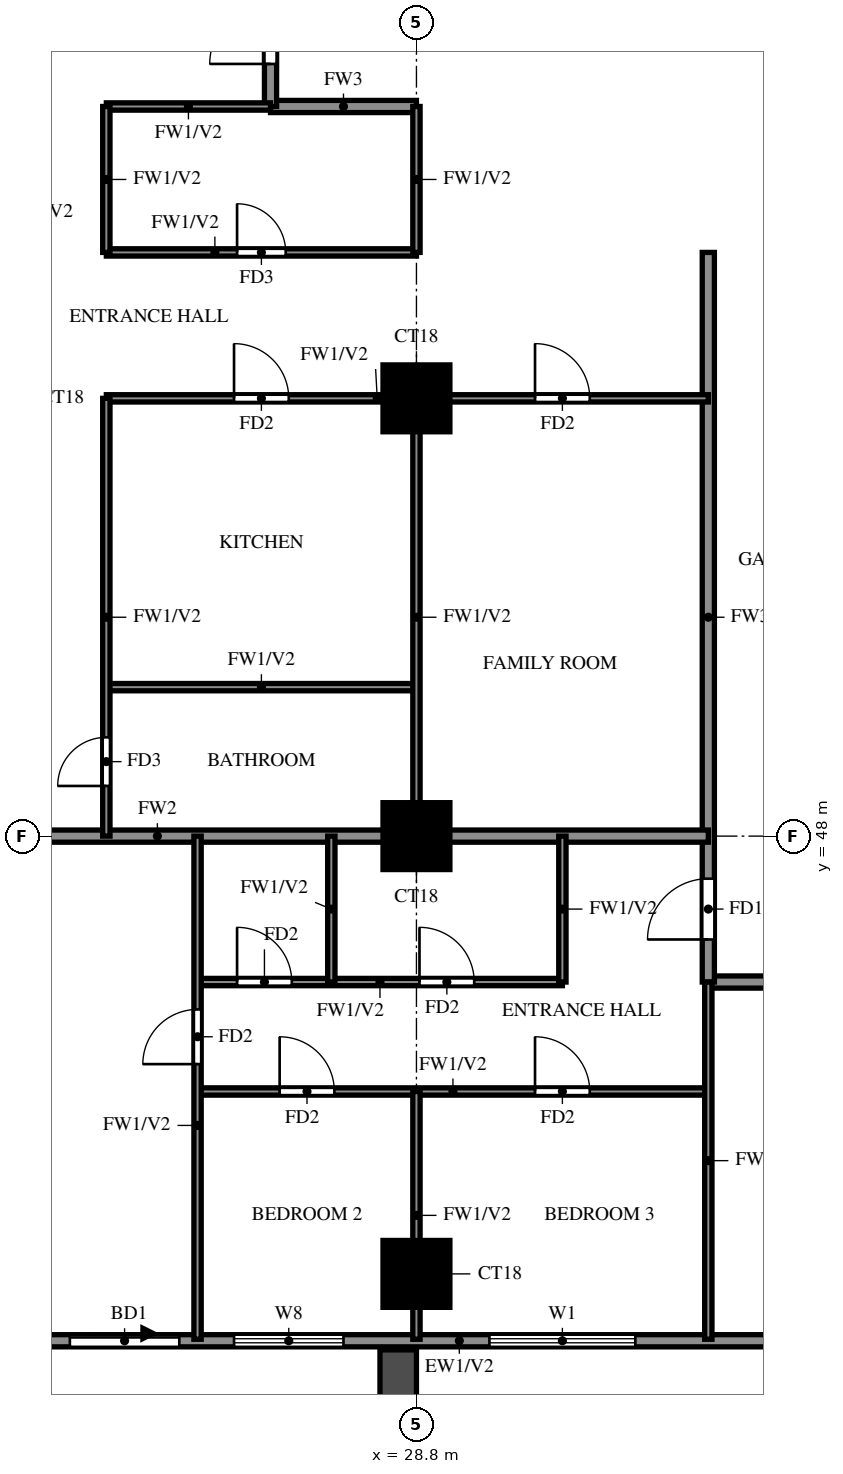
"""IFC4 building model, lengths in metres.
Left out: names, types, materials, properties, quantities, classifications, styles, units other than length and angle.
Written with IfcOpenShell. Run it as: python <this file> out.ifc"""

import sys

from ifc_helpers import new_model, si_unit, direction, frame, frame_2d, origin, origin_2d, place, context, subcontext, project, spatial, rectangle, extrude, source, transform, mapped, element, fill, save


model = new_model("IFC4")
c1 = context("Model", 3, precision=1e-05, world=origin(), true_north=direction((0.0, 1.0)))
c2 = subcontext(c1, "Body", "Model", "MODEL_VIEW")
j1 = project(units=[si_unit("LENGTHUNIT", "METRE"), si_unit("PLANEANGLEUNIT", "RADIAN")], contexts=[c1])
p1 = place(None, origin())
s1 = spatial("IfcSite", under=j1, at=p1, CompositionType="ELEMENT")
p2 = place(p1, origin())
s2 = spatial("IfcBuilding", under=s1, at=p2, CompositionType="ELEMENT")
p3 = place(p2, frame((0.0, 0.0, 116.5)))
s3 = spatial("IfcBuildingStorey", under=s2, at=p3, CompositionType="ELEMENT", Elevation=116.5)
m1 = source(origin(), c2, "Body", "SweptSolid", [
    extrude(rectangle(XDim=1.1, YDim=1.1, at=origin_2d()), origin(), (0.0, 0.0, 1.0), 3.2),
])
for number, where, z_axis, x_axis in (
    (1, (28.8, 40.8, 0.0), (0.0, 0.0, 1.0), (1.0, 0.0, 0.0)),
    (2, (28.8, 48.0, 0.0), (0.0, 0.0, 1.0), (1.0, 0.0, 0.0)),
    (3, (28.8, 55.2, 0.0), (0.0, 0.0, 1.0), (1.0, 0.0, 0.0)),
):
    element("IfcColumn", number, at=place(p3, frame(where, z_axis=z_axis, x_axis=x_axis)), inside=s3, PredefinedType="COLUMN", context=c2, shape_type="MappedRepresentation", body=[
        mapped(m1, transform((0.0, 0.0, 0.0))),
    ])
p4 = place(p3, frame((18.2, 39.7, 0.0), z_axis=(0.0, 0.0, 1.0), x_axis=(1.0, 0.0, 0.0)))
e4 = element("IfcWall", 4, at=p4, inside=s3, PredefinedType="SOLIDWALL", context=c2, shape_type="SweptSolid", body=[
    extrude(rectangle(XDim=23.8, YDim=0.2, at=frame_2d((11.9, 0.0))), origin(), (0.0, 0.0, 1.0), 3.2),
])
p5 = place(p4, frame((4.9, 0.0, 0.0)))
e5 = element("IfcOpeningElement", 5, at=p5, cuts=e4, PredefinedType="OPENING", context=c2, shape_type="SweptSolid", body=[
    extrude(rectangle(XDim=1.8, YDim=2.4, at=frame_2d((0.9, 1.2))), frame((0.0, 0.11, 0.0), z_axis=(0.0, -1.0, 0.0), x_axis=(1.0, 0.0, 0.0)), (0.0, 0.0, 1.0), 0.22),
])
p6 = place(p4, frame((0.6, 0.0, 0.6)))
e6 = element("IfcOpeningElement", 6, at=p6, cuts=e4, PredefinedType="OPENING", context=c2, shape_type="SweptSolid", body=[
    extrude(rectangle(XDim=2.4, YDim=2.4, at=frame_2d((1.2, 1.2))), frame((0.0, 0.11, 0.0), z_axis=(0.0, -1.0, 0.0), x_axis=(1.0, 0.0, 0.0)), (0.0, 0.0, 1.0), 0.22),
])
p7 = place(p4, frame((7.6, 0.0, 0.6)))
e7 = element("IfcOpeningElement", 7, at=p7, cuts=e4, PredefinedType="OPENING", context=c2, shape_type="SweptSolid", body=[
    extrude(rectangle(XDim=1.8, YDim=2.4, at=frame_2d((0.9, 1.2))), frame((0.0, 0.11, 0.0), z_axis=(0.0, -1.0, 0.0), x_axis=(1.0, 0.0, 0.0)), (0.0, 0.0, 1.0), 0.22),
])
p8 = place(p4, frame((11.8, 0.0, 0.6)))
e8 = element("IfcOpeningElement", 8, at=p8, cuts=e4, PredefinedType="OPENING", context=c2, shape_type="SweptSolid", body=[
    extrude(rectangle(XDim=2.4, YDim=2.4, at=frame_2d((1.2, 1.2))), frame((0.0, 0.11, 0.0), z_axis=(0.0, -1.0, 0.0), x_axis=(1.0, 0.0, 0.0)), (0.0, 0.0, 1.0), 0.22),
])
p9 = place(p3, frame((28.5, 39.55, 0.0), z_axis=(0.0, 0.0, 1.0), x_axis=(0.0, -1.0, 0.0)))
e9 = element("IfcWall", 9, at=p9, inside=s3, PredefinedType="SOLIDWALL", context=c2, shape_type="SweptSolid", body=[
    extrude(rectangle(XDim=2.65, YDim=0.6, at=frame_2d((1.325, 0.0))), origin(), (0.0, 0.0, 1.0), 2.85),
])
p10 = place(p3, frame((33.6, 45.6, 0.0), z_axis=(0.0, 0.0, 1.0), x_axis=(1.0, 0.0, 0.0)))
e10 = element("IfcWall", 10, at=p10, inside=s3, PredefinedType="SOLIDWALL", context=c2, shape_type="SweptSolid", body=[
    extrude(rectangle(XDim=7.2, YDim=0.2, at=frame_2d((3.6, 0.0))), origin(), (0.0, 0.0, 1.0), 3.2),
])
p11 = place(p10, frame((3.15, 0.0, 0.0)))
e11 = element("IfcOpeningElement", 11, at=p11, cuts=e10, PredefinedType="OPENING", context=c2, shape_type="SweptSolid", body=[
    extrude(rectangle(XDim=0.9, YDim=2.1, at=frame_2d((0.45, 1.05))), frame((0.0, 0.11, 0.0), z_axis=(0.0, -1.0, 0.0), x_axis=(1.0, 0.0, 0.0)), (0.0, 0.0, 1.0), 0.22),
])
p12 = place(p3, frame((26.4, 60.0, 0.0), z_axis=(0.0, 0.0, 1.0), x_axis=(1.0, 0.0, 0.0)))
e12 = element("IfcWall", 12, at=p12, inside=s3, PredefinedType="SOLIDWALL", context=c2, shape_type="SweptSolid", body=[
    extrude(rectangle(XDim=2.4, YDim=0.2, at=frame_2d((1.2, 0.0))), origin(), (0.0, 0.0, 1.0), 3.2),
])
p13 = place(p3, frame((26.4, 60.0, 0.0), z_axis=(0.0, 0.0, 1.0), x_axis=(0.0, 1.0, 0.0)))
e13 = element("IfcWall", 13, at=p13, inside=s3, PredefinedType="SOLIDWALL", context=c2, shape_type="SweptSolid", body=[
    extrude(rectangle(XDim=9.6, YDim=0.2, at=frame_2d((4.8, 0.0))), origin(), (0.0, 0.0, 1.0), 3.2),
])
p14 = place(p13, frame((0.7, 0.0, 0.0)))
e14 = element("IfcOpeningElement", 14, at=p14, cuts=e13, PredefinedType="OPENING", context=c2, shape_type="SweptSolid", body=[
    extrude(rectangle(XDim=1.0, YDim=2.1, at=frame_2d((0.5, 1.05))), frame((0.0, 0.11, 0.0), z_axis=(0.0, -1.0, 0.0), x_axis=(1.0, 0.0, 0.0)), (0.0, 0.0, 1.0), 0.22),
])
p15 = place(p13, frame((3.1, 0.0, 0.0)))
e15 = element("IfcOpeningElement", 15, at=p15, cuts=e13, PredefinedType="OPENING", context=c2, shape_type="SweptSolid", body=[
    extrude(rectangle(XDim=1.0, YDim=2.1, at=frame_2d((0.5, 1.05))), frame((0.0, 0.11, 0.0), z_axis=(0.0, -1.0, 0.0), x_axis=(1.0, 0.0, 0.0)), (0.0, 0.0, 1.0), 0.22),
])
p16 = place(p3, frame((33.6, 45.6, 0.0), z_axis=(0.0, 0.0, 1.0), x_axis=(0.0, 1.0, 0.0)))
e16 = element("IfcWall", 16, at=p16, inside=s3, PredefinedType="SOLIDWALL", context=c2, shape_type="SweptSolid", body=[
    extrude(rectangle(XDim=12.0, YDim=0.2, at=frame_2d((6.0, 0.0))), origin(), (0.0, 0.0, 1.0), 3.2),
])
p17 = place(p16, frame((0.7, 0.0, 0.0)))
e17 = element("IfcOpeningElement", 17, at=p17, cuts=e16, PredefinedType="OPENING", context=c2, shape_type="SweptSolid", body=[
    extrude(rectangle(XDim=1.0, YDim=2.1, at=frame_2d((0.5, 1.05))), frame((0.0, 0.11, 0.0), z_axis=(0.0, -1.0, 0.0), x_axis=(1.0, 0.0, 0.0)), (0.0, 0.0, 1.0), 0.22),
])
p18 = place(p3, frame((14.525, 48.0, 0.0), z_axis=(0.0, 0.0, 1.0), x_axis=(1.0, 0.0, 0.0)))
e18 = element("IfcWall", 18, at=p18, inside=s3, PredefinedType="SOLIDWALL", context=c2, shape_type="SweptSolid", body=[
    extrude(rectangle(XDim=19.075, YDim=0.2, at=frame_2d((9.538, 0.0))), origin(), (0.0, 0.0, 1.0), 3.2),
])
p19 = place(p3, frame((25.2, 43.8, 0.0), z_axis=(0.0, 0.0, 1.0), x_axis=(1.0, 0.0, 0.0)))
e19 = element("IfcWall", 19, at=p19, inside=s3, PredefinedType="PARTITIONING", context=c2, shape_type="SweptSolid", body=[
    extrude(rectangle(XDim=8.4, YDim=0.12, at=frame_2d((4.2, 0.0))), origin(), (0.0, 0.0, 1.0), 3.2),
])
p20 = place(p19, frame((1.35, 0.0, 0.0)))
e20 = element("IfcOpeningElement", 20, at=p20, cuts=e19, PredefinedType="OPENING", context=c2, shape_type="SweptSolid", body=[
    extrude(rectangle(XDim=0.9, YDim=2.1, at=frame_2d((0.45, 1.05))), frame((0.0, 0.07, 0.0), z_axis=(0.0, -1.0, 0.0), x_axis=(1.0, 0.0, 0.0)), (0.0, 0.0, 1.0), 0.14),
])
p21 = place(p19, frame((5.55, 0.0, 0.0)))
e21 = element("IfcOpeningElement", 21, at=p21, cuts=e19, PredefinedType="OPENING", context=c2, shape_type="SweptSolid", body=[
    extrude(rectangle(XDim=0.9, YDim=2.1, at=frame_2d((0.45, 1.05))), frame((0.0, 0.07, 0.0), z_axis=(0.0, -1.0, 0.0), x_axis=(1.0, 0.0, 0.0)), (0.0, 0.0, 1.0), 0.14),
])
p22 = place(p3, frame((25.2, 45.6, 0.0), z_axis=(0.0, 0.0, 1.0), x_axis=(1.0, 0.0, 0.0)))
e22 = element("IfcWall", 22, at=p22, inside=s3, PredefinedType="PARTITIONING", context=c2, shape_type="SweptSolid", body=[
    extrude(rectangle(XDim=6.0, YDim=0.12, at=frame_2d((3.0, 0.0))), origin(), (0.0, 0.0, 1.0), 3.2),
])
p23 = place(p22, frame((0.65, 0.0, 0.0)))
e23 = element("IfcOpeningElement", 23, at=p23, cuts=e22, PredefinedType="OPENING", context=c2, shape_type="SweptSolid", body=[
    extrude(rectangle(XDim=0.9, YDim=2.1, at=frame_2d((0.45, 1.05))), frame((0.0, 0.07, 0.0), z_axis=(0.0, -1.0, 0.0), x_axis=(1.0, 0.0, 0.0)), (0.0, 0.0, 1.0), 0.14),
])
p24 = place(p22, frame((3.65, 0.0, 0.0)))
e24 = element("IfcOpeningElement", 24, at=p24, cuts=e22, PredefinedType="OPENING", context=c2, shape_type="SweptSolid", body=[
    extrude(rectangle(XDim=0.9, YDim=2.1, at=frame_2d((0.45, 1.05))), frame((0.0, 0.07, 0.0), z_axis=(0.0, -1.0, 0.0), x_axis=(1.0, 0.0, 0.0)), (0.0, 0.0, 1.0), 0.14),
])
p25 = place(p3, frame((23.7, 50.45, 0.0), z_axis=(0.0, 0.0, 1.0), x_axis=(1.0, 0.0, 0.0)))
e25 = element("IfcWall", 25, at=p25, inside=s3, PredefinedType="PARTITIONING", context=c2, shape_type="SweptSolid", body=[
    extrude(rectangle(XDim=5.1, YDim=0.12, at=frame_2d((2.55, 0.0))), origin(), (0.0, 0.0, 1.0), 3.2),
])
p26 = place(p3, frame((23.7, 55.2, 0.0), z_axis=(0.0, 0.0, 1.0), x_axis=(1.0, 0.0, 0.0)))
e26 = element("IfcWall", 26, at=p26, inside=s3, PredefinedType="PARTITIONING", context=c2, shape_type="SweptSolid", body=[
    extrude(rectangle(XDim=9.9, YDim=0.12, at=frame_2d((4.95, 0.0))), origin(), (0.0, 0.0, 1.0), 3.2),
])
p27 = place(p26, frame((2.1, 0.0, 0.0)))
e27 = element("IfcOpeningElement", 27, at=p27, cuts=e26, PredefinedType="OPENING", context=c2, shape_type="SweptSolid", body=[
    extrude(rectangle(XDim=0.9, YDim=2.1, at=frame_2d((0.45, 1.05))), frame((0.0, 0.07, 0.0), z_axis=(0.0, -1.0, 0.0), x_axis=(1.0, 0.0, 0.0)), (0.0, 0.0, 1.0), 0.14),
])
p28 = place(p26, frame((7.05, 0.0, 0.0)))
e28 = element("IfcOpeningElement", 28, at=p28, cuts=e26, PredefinedType="OPENING", context=c2, shape_type="SweptSolid", body=[
    extrude(rectangle(XDim=0.9, YDim=2.1, at=frame_2d((0.45, 1.05))), frame((0.0, 0.07, 0.0), z_axis=(0.0, -1.0, 0.0), x_axis=(1.0, 0.0, 0.0)), (0.0, 0.0, 1.0), 0.14),
])
p29 = place(p3, frame((23.7, 57.6, 0.0), z_axis=(0.0, 0.0, 1.0), x_axis=(1.0, 0.0, 0.0)))
e29 = element("IfcWall", 29, at=p29, inside=s3, PredefinedType="PARTITIONING", context=c2, shape_type="SweptSolid", body=[
    extrude(rectangle(XDim=5.1, YDim=0.12, at=frame_2d((2.55, 0.0))), origin(), (0.0, 0.0, 1.0), 3.2),
])
p30 = place(p29, frame((2.15, 0.0, 0.0)))
e30 = element("IfcOpeningElement", 30, at=p30, cuts=e29, PredefinedType="OPENING", context=c2, shape_type="SweptSolid", body=[
    extrude(rectangle(XDim=0.8, YDim=2.1, at=frame_2d((0.4, 1.05))), frame((0.0, 0.07, 0.0), z_axis=(0.0, -1.0, 0.0), x_axis=(1.0, 0.0, 0.0)), (0.0, 0.0, 1.0), 0.14),
])
p31 = place(p3, frame((23.7, 60.0, 0.0), z_axis=(0.0, 0.0, 1.0), x_axis=(1.0, 0.0, 0.0)))
e31 = element("IfcWall", 31, at=p31, inside=s3, PredefinedType="PARTITIONING", context=c2, shape_type="SweptSolid", body=[
    extrude(rectangle(XDim=2.7, YDim=0.12, at=frame_2d((1.35, 0.0))), origin(), (0.0, 0.0, 1.0), 3.2),
])
p32 = place(p3, frame((23.7, 48.0, 0.0), z_axis=(0.0, 0.0, 1.0), x_axis=(0.0, 1.0, 0.0)))
e32 = element("IfcWall", 32, at=p32, inside=s3, PredefinedType="PARTITIONING", context=c2, shape_type="SweptSolid", body=[
    extrude(rectangle(XDim=7.2, YDim=0.12, at=frame_2d((3.6, 0.0))), origin(), (0.0, 0.0, 1.0), 3.2),
])
p33 = place(p32, frame((0.825, 0.0, 0.0)))
e33 = element("IfcOpeningElement", 33, at=p33, cuts=e32, PredefinedType="OPENING", context=c2, shape_type="SweptSolid", body=[
    extrude(rectangle(XDim=0.8, YDim=2.1, at=frame_2d((0.4, 1.05))), frame((0.0, 0.07, 0.0), z_axis=(0.0, -1.0, 0.0), x_axis=(1.0, 0.0, 0.0)), (0.0, 0.0, 1.0), 0.14),
])
p34 = place(p3, frame((23.7, 57.6, 0.0), z_axis=(0.0, 0.0, 1.0), x_axis=(0.0, 1.0, 0.0)))
e34 = element("IfcWall", 34, at=p34, inside=s3, PredefinedType="PARTITIONING", context=c2, shape_type="SweptSolid", body=[
    extrude(rectangle(XDim=2.4, YDim=0.12, at=frame_2d((1.2, 0.0))), origin(), (0.0, 0.0, 1.0), 3.2),
])
p35 = place(p3, frame((25.2, 39.725, 0.0), z_axis=(0.0, 0.0, 1.0), x_axis=(0.0, 1.0, 0.0)))
e35 = element("IfcWall", 35, at=p35, inside=s3, PredefinedType="PARTITIONING", context=c2, shape_type="SweptSolid", body=[
    extrude(rectangle(XDim=8.275, YDim=0.12, at=frame_2d((4.137, 0.0))), origin(), (0.0, 0.0, 1.0), 3.2),
])
p36 = place(p35, frame((4.525, 0.0, 0.0)))
e36 = element("IfcOpeningElement", 36, at=p36, cuts=e35, PredefinedType="OPENING", context=c2, shape_type="SweptSolid", body=[
    extrude(rectangle(XDim=0.9, YDim=2.1, at=frame_2d((0.45, 1.05))), frame((0.0, 0.07, 0.0), z_axis=(0.0, -1.0, 0.0), x_axis=(1.0, 0.0, 0.0)), (0.0, 0.0, 1.0), 0.14),
])
p37 = place(p3, frame((27.4, 45.6, 0.0), z_axis=(0.0, 0.0, 1.0), x_axis=(0.0, 1.0, 0.0)))
e37 = element("IfcWall", 37, at=p37, inside=s3, PredefinedType="PARTITIONING", context=c2, shape_type="SweptSolid", body=[
    extrude(rectangle(XDim=2.4, YDim=0.12, at=frame_2d((1.2, 0.0))), origin(), (0.0, 0.0, 1.0), 3.2),
])
p38 = place(p3, frame((28.8, 39.725, 0.0), z_axis=(0.0, 0.0, 1.0), x_axis=(0.0, 1.0, 0.0)))
e38 = element("IfcWall", 38, at=p38, inside=s3, PredefinedType="PARTITIONING", context=c2, shape_type="SweptSolid", body=[
    extrude(rectangle(XDim=4.075, YDim=0.12, at=frame_2d((2.038, 0.0))), origin(), (0.0, 0.0, 1.0), 3.2),
])
p39 = place(p3, frame((28.8, 48.0, 0.0), z_axis=(0.0, 0.0, 1.0), x_axis=(0.0, 1.0, 0.0)))
e39 = element("IfcWall", 39, at=p39, inside=s3, PredefinedType="PARTITIONING", context=c2, shape_type="SweptSolid", body=[
    extrude(rectangle(XDim=7.2, YDim=0.12, at=frame_2d((3.6, 0.0))), origin(), (0.0, 0.0, 1.0), 3.2),
])
for number, where, z_axis, x_axis in (
    (40, (28.8, 57.6, 0.0), (0.0, 0.0, 1.0), (0.0, 1.0, 0.0)),
    (41, (31.2, 45.6, 0.0), (0.0, 0.0, 1.0), (0.0, 1.0, 0.0)),
):
    element("IfcWall", number, at=place(p3, frame(where, z_axis=z_axis, x_axis=x_axis)), inside=s3, PredefinedType="PARTITIONING", context=c2, shape_type="SweptSolid", body=[
        extrude(rectangle(XDim=2.4, YDim=0.12, at=frame_2d((1.2, 0.0))), origin(), (0.0, 0.0, 1.0), 3.2),
    ])
p40 = place(p3, frame((33.6, 39.725, 0.0), z_axis=(0.0, 0.0, 1.0), x_axis=(0.0, 1.0, 0.0)))
e42 = element("IfcWall", 42, at=p40, inside=s3, PredefinedType="PARTITIONING", context=c2, shape_type="SweptSolid", body=[
    extrude(rectangle(XDim=5.875, YDim=0.12, at=frame_2d((2.938, 0.0))), origin(), (0.0, 0.0, 1.0), 3.2),
])
p41 = place(p5, origin())
e43 = element("IfcDoor", 43, at=p41, inside=s3, OperationType="DOUBLE_DOOR_SLIDING", PredefinedType="DOOR", context=c2, shape_type="SweptSolid", body=[
    extrude(rectangle(XDim=1.8, YDim=2.4, at=frame_2d((0.9, 1.2))), frame((0.0, 0.025, 0.0), z_axis=(0.0, -1.0, 0.0), x_axis=(1.0, 0.0, 0.0)), (0.0, 0.0, 1.0), 0.05),
])
fill(e5, e43)
p42 = place(p7, origin())
e44 = element("IfcWindow", 44, at=p42, inside=s3, PartitioningType="DOUBLE_PANEL_VERTICAL", PredefinedType="WINDOW", context=c2, shape_type="SweptSolid", body=[
    extrude(rectangle(XDim=1.8, YDim=2.4, at=frame_2d((0.9, 1.2))), frame((0.0, 0.03, 0.0), z_axis=(0.0, -1.0, 0.0), x_axis=(1.0, 0.0, 0.0)), (0.0, 0.0, 1.0), 0.06),
])
fill(e7, e44)
p43 = place(p8, origin())
e45 = element("IfcWindow", 45, at=p43, inside=s3, PartitioningType="DOUBLE_PANEL_VERTICAL", PredefinedType="WINDOW", context=c2, shape_type="SweptSolid", body=[
    extrude(rectangle(XDim=2.4, YDim=2.4, at=frame_2d((1.2, 1.2))), frame((0.0, 0.03, 0.0), z_axis=(0.0, -1.0, 0.0), x_axis=(1.0, 0.0, 0.0)), (0.0, 0.0, 1.0), 0.06),
])
fill(e8, e45)
p44 = place(p17, origin())
e46 = element("IfcDoor", 46, at=p44, inside=s3, OperationType="SINGLE_SWING_RIGHT", PredefinedType="DOOR", context=c2, shape_type="SweptSolid", body=[
    extrude(rectangle(XDim=1.0, YDim=2.1, at=frame_2d((0.5, 1.05))), frame((0.0, 0.025, 0.0), z_axis=(0.0, -1.0, 0.0), x_axis=(1.0, 0.0, 0.0)), (0.0, 0.0, 1.0), 0.05),
])
fill(e17, e46)
p45 = place(p36, origin())
e47 = element("IfcDoor", 47, at=p45, inside=s3, OperationType="SINGLE_SWING_LEFT", PredefinedType="DOOR", context=c2, shape_type="SweptSolid", body=[
    extrude(rectangle(XDim=0.9, YDim=2.1, at=frame_2d((0.45, 1.05))), frame((0.0, 0.025, 0.0), z_axis=(0.0, -1.0, 0.0), x_axis=(1.0, 0.0, 0.0)), (0.0, 0.0, 1.0), 0.05),
])
fill(e36, e47)
p46 = place(p20, origin())
e48 = element("IfcDoor", 48, at=p46, inside=s3, OperationType="SINGLE_SWING_LEFT", PredefinedType="DOOR", context=c2, shape_type="SweptSolid", body=[
    extrude(rectangle(XDim=0.9, YDim=2.1, at=frame_2d((0.45, 1.05))), frame((0.0, 0.025, 0.0), z_axis=(0.0, -1.0, 0.0), x_axis=(1.0, 0.0, 0.0)), (0.0, 0.0, 1.0), 0.05),
])
fill(e20, e48)
p47 = place(p21, origin())
e49 = element("IfcDoor", 49, at=p47, inside=s3, OperationType="SINGLE_SWING_RIGHT", PredefinedType="DOOR", context=c2, shape_type="SweptSolid", body=[
    extrude(rectangle(XDim=0.9, YDim=2.1, at=frame_2d((0.45, 1.05))), frame((0.0, 0.025, 0.0), z_axis=(0.0, -1.0, 0.0), x_axis=(1.0, 0.0, 0.0)), (0.0, 0.0, 1.0), 0.05),
])
fill(e21, e49)
p48 = place(p23, origin())
e50 = element("IfcDoor", 50, at=p48, inside=s3, OperationType="SINGLE_SWING_LEFT", PredefinedType="DOOR", context=c2, shape_type="SweptSolid", body=[
    extrude(rectangle(XDim=0.9, YDim=2.1, at=frame_2d((0.45, 1.05))), frame((0.0, 0.025, 0.0), z_axis=(0.0, -1.0, 0.0), x_axis=(1.0, 0.0, 0.0)), (0.0, 0.0, 1.0), 0.05),
])
fill(e23, e50)
p49 = place(p24, origin())
e51 = element("IfcDoor", 51, at=p49, inside=s3, OperationType="SINGLE_SWING_LEFT", PredefinedType="DOOR", context=c2, shape_type="SweptSolid", body=[
    extrude(rectangle(XDim=0.9, YDim=2.1, at=frame_2d((0.45, 1.05))), frame((0.0, 0.025, 0.0), z_axis=(0.0, -1.0, 0.0), x_axis=(1.0, 0.0, 0.0)), (0.0, 0.0, 1.0), 0.05),
])
fill(e24, e51)
p50 = place(p14, origin())
e52 = element("IfcDoor", 52, at=p50, inside=s3, OperationType="SINGLE_SWING_LEFT", PredefinedType="DOOR", context=c2, shape_type="SweptSolid", body=[
    extrude(rectangle(XDim=1.0, YDim=2.1, at=frame_2d((0.5, 1.05))), frame((0.0, 0.025, 0.0), z_axis=(0.0, -1.0, 0.0), x_axis=(1.0, 0.0, 0.0)), (0.0, 0.0, 1.0), 0.05),
])
fill(e14, e52)
p51 = place(p33, origin())
e53 = element("IfcDoor", 53, at=p51, inside=s3, OperationType="SINGLE_SWING_LEFT", PredefinedType="DOOR", context=c2, shape_type="SweptSolid", body=[
    extrude(rectangle(XDim=0.8, YDim=2.1, at=frame_2d((0.4, 1.05))), frame((0.0, 0.025, 0.0), z_axis=(0.0, -1.0, 0.0), x_axis=(1.0, 0.0, 0.0)), (0.0, 0.0, 1.0), 0.05),
])
fill(e33, e53)
p52 = place(p27, origin())
e54 = element("IfcDoor", 54, at=p52, inside=s3, OperationType="SINGLE_SWING_RIGHT", PredefinedType="DOOR", context=c2, shape_type="SweptSolid", body=[
    extrude(rectangle(XDim=0.9, YDim=2.1, at=frame_2d((0.45, 1.05))), frame((0.0, 0.025, 0.0), z_axis=(0.0, -1.0, 0.0), x_axis=(1.0, 0.0, 0.0)), (0.0, 0.0, 1.0), 0.05),
])
fill(e27, e54)
p53 = place(p30, origin())
e55 = element("IfcDoor", 55, at=p53, inside=s3, OperationType="SINGLE_SWING_LEFT", PredefinedType="DOOR", context=c2, shape_type="SweptSolid", body=[
    extrude(rectangle(XDim=0.8, YDim=2.1, at=frame_2d((0.4, 1.05))), frame((0.0, 0.025, 0.0), z_axis=(0.0, -1.0, 0.0), x_axis=(1.0, 0.0, 0.0)), (0.0, 0.0, 1.0), 0.05),
])
fill(e30, e55)
p54 = place(p28, origin())
e56 = element("IfcDoor", 56, at=p54, inside=s3, OperationType="SINGLE_SWING_LEFT", PredefinedType="DOOR", context=c2, shape_type="SweptSolid", body=[
    extrude(rectangle(XDim=0.9, YDim=2.1, at=frame_2d((0.45, 1.05))), frame((0.0, 0.025, 0.0), z_axis=(0.0, -1.0, 0.0), x_axis=(1.0, 0.0, 0.0)), (0.0, 0.0, 1.0), 0.05),
])
fill(e28, e56)
save(model, sys.argv[1])
